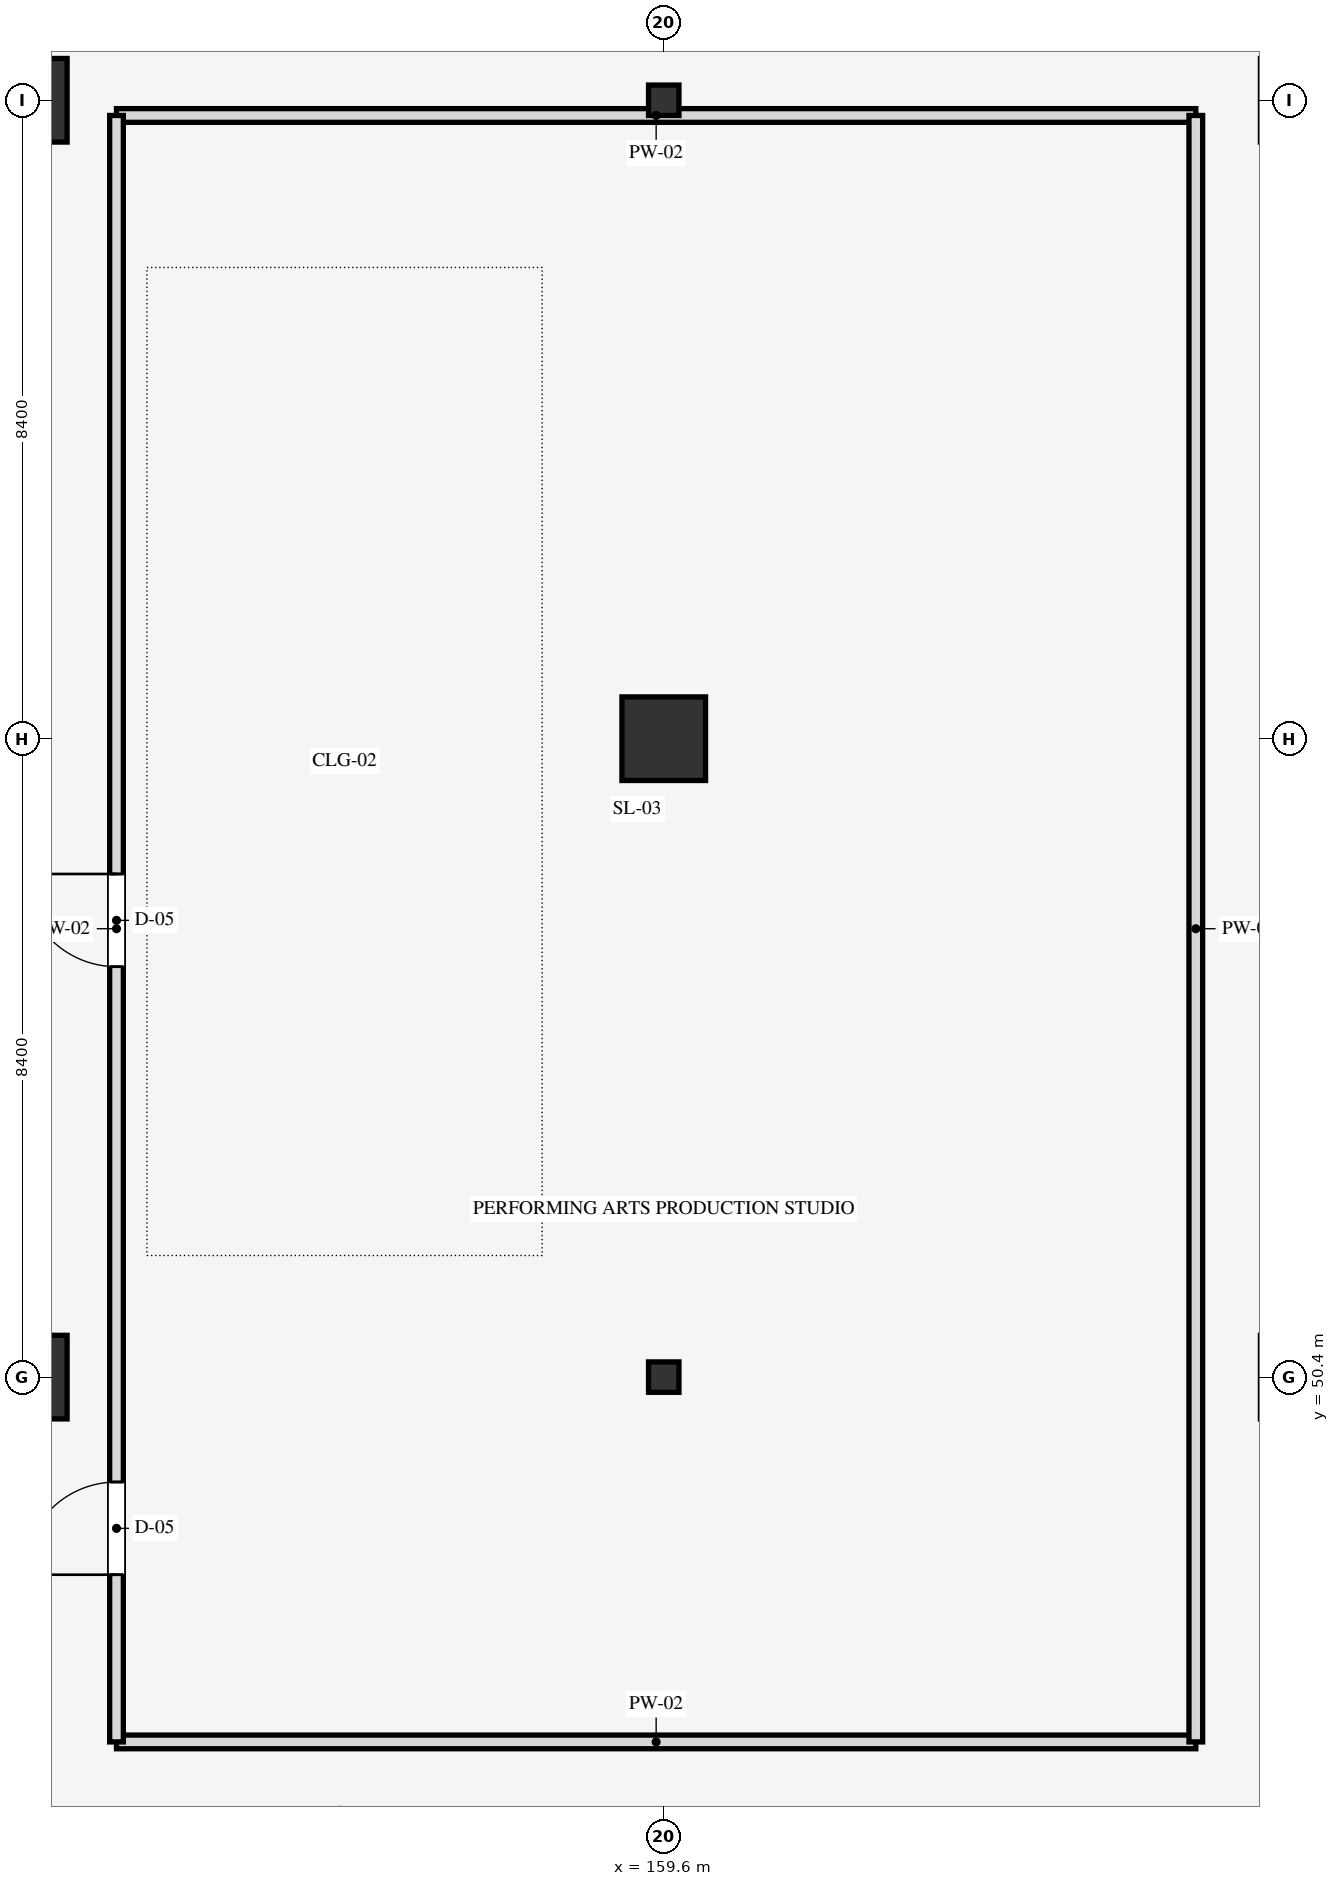
"""IFC4 building model, lengths in metres.
Left out: names, types, materials, properties, quantities, classifications, styles, units other than length and angle.
Written with IfcOpenShell. Run it as: python <this file> out.ifc"""

import sys

from ifc_helpers import new_model, si_unit, direction, frame, frame_2d, origin, origin_2d, place, context, subcontext, project, spatial, rectangle, i_section, extrude, element, fill, save


model = new_model("IFC4")
c1 = context("Model", 3, precision=1e-05, world=origin(), true_north=direction((0.0, 1.0)))
c2 = subcontext(c1, "Body", "Model", "MODEL_VIEW")
j1 = project(units=[si_unit("LENGTHUNIT", "METRE"), si_unit("PLANEANGLEUNIT", "RADIAN")], contexts=[c1])
p1 = place(None, origin())
s1 = spatial("IfcSite", under=j1, at=p1, CompositionType="ELEMENT")
p2 = place(p1, origin())
s2 = spatial("IfcBuilding", under=s1, at=p2, CompositionType="ELEMENT")
p3 = place(p2, frame((0.0, 0.0, 36.3)))
s3 = spatial("IfcBuildingStorey", under=s2, at=p3, CompositionType="ELEMENT", Elevation=36.3)
for number, where, z_axis, x_axis in (
    (1, (151.2, 50.4, 0.0), (0.0, 0.0, 1.0), (1.0, 0.0, 0.0)),
    (2, (151.2, 67.2, 0.0), (0.0, 0.0, 1.0), (1.0, 0.0, 0.0)),
):
    element("IfcColumn", number, at=place(p3, frame(where, z_axis=z_axis, x_axis=x_axis)), inside=s3, PredefinedType="COLUMN", context=c2, shape_type="SweptSolid", body=[
        extrude(rectangle(XDim=1.1, YDim=1.1, at=origin_2d()), origin(), (0.0, 0.0, 1.0), 4.2),
    ])
p4 = place(p3, frame((159.6, 50.4, 0.0), z_axis=(0.0, 0.0, 1.0), x_axis=(1.0, 0.0, 0.0)))
e3 = element("IfcColumn", 3, at=p4, inside=s3, PredefinedType="COLUMN", context=c2, shape_type="SweptSolid", body=[
    extrude(i_section(OverallWidth=0.4, OverallDepth=0.4, WebThickness=0.013, FlangeThickness=0.021, FilletRadius=0.022, at=origin_2d()), origin(), (0.0, 0.0, 1.0), 4.2),
])
p5 = place(p3, frame((159.6, 58.8, 0.0), z_axis=(0.0, 0.0, 1.0), x_axis=(1.0, 0.0, 0.0)))
e4 = element("IfcColumn", 4, at=p5, inside=s3, PredefinedType="COLUMN", context=c2, shape_type="SweptSolid", body=[
    extrude(rectangle(XDim=1.1, YDim=1.1, at=origin_2d()), origin(), (0.0, 0.0, 1.0), 4.2),
])
p6 = place(p3, frame((159.6, 67.2, 0.0), z_axis=(0.0, 0.0, 1.0), x_axis=(1.0, 0.0, 0.0)))
e5 = element("IfcColumn", 5, at=p6, inside=s3, PredefinedType="COLUMN", context=c2, shape_type="SweptSolid", body=[
    extrude(i_section(OverallWidth=0.4, OverallDepth=0.4, WebThickness=0.013, FlangeThickness=0.021, FilletRadius=0.022, at=origin_2d()), origin(), (0.0, 0.0, 1.0), 4.2),
])
for number, where, z_axis, x_axis in (
    (6, (152.4, 45.6, 0.0), (0.0, 0.0, 1.0), (1.0, 0.0, 0.0)),
    (7, (152.4, 67.0, 0.0), (0.0, 0.0, 1.0), (1.0, 0.0, 0.0)),
):
    element("IfcWall", number, at=place(p3, frame(where, z_axis=z_axis, x_axis=x_axis)), inside=s3, PredefinedType="PARTITIONING", context=c2, shape_type="SweptSolid", body=[
        extrude(rectangle(XDim=14.2, YDim=0.18, at=frame_2d((7.1, 0.0))), origin(), (0.0, 0.0, 1.0), 3.24),
    ])
p7 = place(p3, frame((152.4, 45.6, 0.0), z_axis=(0.0, 0.0, 1.0), x_axis=(0.0, 1.0, 0.0)))
e8 = element("IfcWall", 8, at=p7, inside=s3, PredefinedType="PARTITIONING", context=c2, shape_type="SweptSolid", body=[
    extrude(rectangle(XDim=21.4, YDim=0.18, at=frame_2d((10.7, 0.0))), origin(), (0.0, 0.0, 1.0), 3.24),
])
p8 = place(p7, frame((2.2, 0.0, 0.0)))
e9 = element("IfcOpeningElement", 9, at=p8, cuts=e8, PredefinedType="OPENING", context=c2, shape_type="SweptSolid", body=[
    extrude(rectangle(XDim=1.22, YDim=2.15, at=frame_2d((0.61, 1.075))), frame((0.0, 0.1, 0.0), z_axis=(0.0, -1.0, 0.0), x_axis=(1.0, 0.0, 0.0)), (0.0, 0.0, 1.0), 0.2),
])
p9 = place(p7, frame((10.2, 0.0, 0.0)))
e10 = element("IfcOpeningElement", 10, at=p9, cuts=e8, PredefinedType="OPENING", context=c2, shape_type="SweptSolid", body=[
    extrude(rectangle(XDim=1.22, YDim=2.15, at=frame_2d((0.61, 1.075))), frame((0.0, 0.1, 0.0), z_axis=(0.0, -1.0, 0.0), x_axis=(1.0, 0.0, 0.0)), (0.0, 0.0, 1.0), 0.2),
])
p10 = place(p3, frame((166.6, 45.6, 0.0), z_axis=(0.0, 0.0, 1.0), x_axis=(0.0, 1.0, 0.0)))
e11 = element("IfcWall", 11, at=p10, inside=s3, PredefinedType="PARTITIONING", context=c2, shape_type="SweptSolid", body=[
    extrude(rectangle(XDim=21.4, YDim=0.18, at=frame_2d((10.7, 0.0))), origin(), (0.0, 0.0, 1.0), 3.24),
])
p11 = place(p8, origin())
e12 = element("IfcDoor", 12, at=p11, inside=s3, OperationType="SINGLE_SWING_LEFT", PredefinedType="DOOR", context=c2, shape_type="SweptSolid", body=[
    extrude(rectangle(XDim=1.22, YDim=2.15, at=frame_2d((0.61, 1.075))), frame((0.0, 0.025, 0.0), z_axis=(0.0, -1.0, 0.0), x_axis=(1.0, 0.0, 0.0)), (0.0, 0.0, 1.0), 0.05),
])
fill(e9, e12)
p12 = place(p9, origin())
e13 = element("IfcDoor", 13, at=p12, inside=s3, OperationType="SINGLE_SWING_RIGHT", PredefinedType="DOOR", context=c2, shape_type="SweptSolid", body=[
    extrude(rectangle(XDim=1.22, YDim=2.15, at=frame_2d((0.61, 1.075))), frame((0.0, 0.025, 0.0), z_axis=(0.0, -1.0, 0.0), x_axis=(1.0, 0.0, 0.0)), (0.0, 0.0, 1.0), 0.05),
])
fill(e10, e13)
save(model, sys.argv[1])
